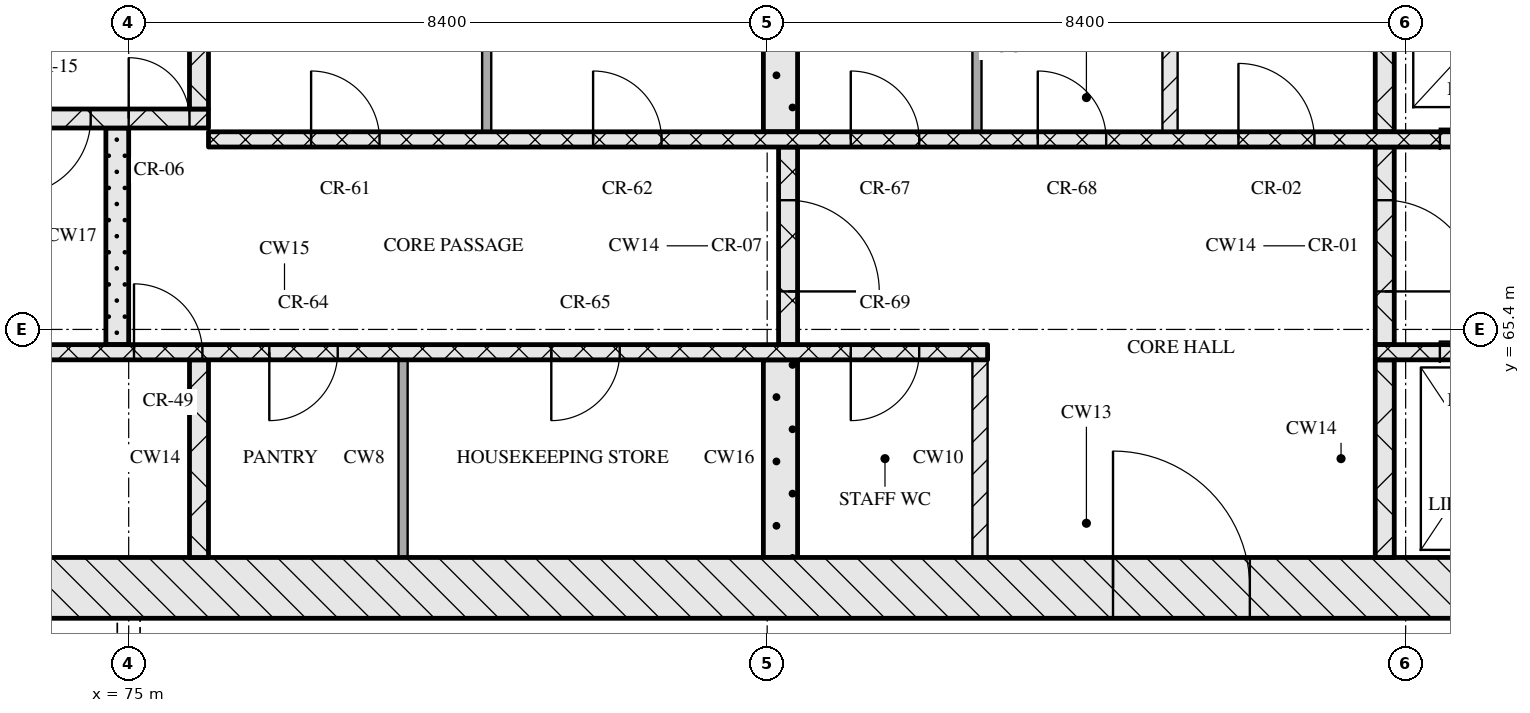
"""IFC4 building model, lengths in metres.
Left out: names, types, materials, properties, quantities, classifications, styles, units other than length and angle.
Written with IfcOpenShell. Run it as: python <this file> out.ifc"""

import sys

from ifc_helpers import new_model, si_unit, direction, frame, frame_2d, origin, place, context, subcontext, project, spatial, rectangle, extrude, element, fill, save


model = new_model("IFC4")
c1 = context("Model", 3, precision=1e-05, world=origin(), true_north=direction((0.0, 1.0)))
c2 = subcontext(c1, "Body", "Model", "MODEL_VIEW")
j1 = project(units=[si_unit("LENGTHUNIT", "METRE"), si_unit("PLANEANGLEUNIT", "RADIAN")], contexts=[c1])
p1 = place(None, origin())
s1 = spatial("IfcSite", under=j1, at=p1, CompositionType="ELEMENT")
p2 = place(p1, origin())
s2 = spatial("IfcBuilding", under=s1, at=p2, CompositionType="ELEMENT")
p3 = place(p2, frame((0.0, 0.0, 172.65)))
s3 = spatial("IfcBuildingStorey", under=s2, at=p3, CompositionType="ELEMENT", Elevation=172.65)
p4 = place(p3, frame((67.0, 62.0, 0.0), z_axis=(0.0, 0.0, 1.0), x_axis=(1.0, 0.0, 0.0)))
e1 = element("IfcWall", 1, at=p4, inside=s3, PredefinedType="SOLIDWALL", context=c2, shape_type="SweptSolid", body=[
    extrude(rectangle(XDim=41.2, YDim=0.8, at=frame_2d((20.6, 0.0))), origin(), (0.0, 0.0, 1.0), 3.32),
])
p5 = place(p4, frame((20.95, 0.0, 0.0)))
e2 = element("IfcOpeningElement", 2, at=p5, cuts=e1, PredefinedType="OPENING", context=c2, shape_type="SweptSolid", body=[
    extrude(rectangle(XDim=1.8, YDim=2.1, at=frame_2d((0.9, 1.05))), frame((0.0, 0.41, 0.0), z_axis=(0.0, -1.0, 0.0), x_axis=(1.0, 0.0, 0.0)), (0.0, 0.0, 1.0), 0.82),
])
p6 = place(p3, frame((75.925, 62.4, 0.0), z_axis=(0.0, 0.0, 1.0), x_axis=(0.0, 1.0, 0.0)))
e3 = element("IfcWall", 3, at=p6, inside=s3, PredefinedType="SOLIDWALL", context=c2, shape_type="SweptSolid", body=[
    extrude(rectangle(XDim=2.6, YDim=0.25, at=frame_2d((1.3, 0.0))), origin(), (0.0, 0.0, 1.0), 3.32),
])
p7 = place(p3, frame((78.61, 62.4, 0.0), z_axis=(0.0, 0.0, 1.0), x_axis=(0.0, 1.0, 0.0)))
e4 = element("IfcWall", 4, at=p7, inside=s3, PredefinedType="PARTITIONING", context=c2, shape_type="SweptSolid", body=[
    extrude(rectangle(XDim=2.6, YDim=0.12, at=frame_2d((1.3, 0.0))), origin(), (0.0, 0.0, 1.0), 3.32),
])
p8 = place(p3, frame((83.575, 62.4, 0.0), z_axis=(0.0, 0.0, 1.0), x_axis=(0.0, 1.0, 0.0)))
e5 = element("IfcWall", 5, at=p8, inside=s3, PredefinedType="SOLIDWALL", context=c2, shape_type="SweptSolid", body=[
    extrude(rectangle(XDim=2.6, YDim=0.45, at=frame_2d((1.3, 0.0))), origin(), (0.0, 0.0, 1.0), 3.32),
])
p9 = place(p3, frame((86.2, 62.4, 0.0), z_axis=(0.0, 0.0, 1.0), x_axis=(0.0, 1.0, 0.0)))
e6 = element("IfcWall", 6, at=p9, inside=s3, PredefinedType="PARTITIONING", context=c2, shape_type="SweptSolid", body=[
    extrude(rectangle(XDim=2.6, YDim=0.2, at=frame_2d((1.3, 0.0))), origin(), (0.0, 0.0, 1.0), 3.32),
])
p10 = place(p3, frame((91.525, 62.4, 0.0), z_axis=(0.0, 0.0, 1.0), x_axis=(0.0, 1.0, 0.0)))
e7 = element("IfcWall", 7, at=p10, inside=s3, PredefinedType="SOLIDWALL", context=c2, shape_type="SweptSolid", body=[
    extrude(rectangle(XDim=2.6, YDim=0.25, at=frame_2d((1.3, 0.0))), origin(), (0.0, 0.0, 1.0), 3.32),
])
p11 = place(p3, frame((67.8, 65.1, 0.0), z_axis=(0.0, 0.0, 1.0), x_axis=(1.0, 0.0, 0.0)))
e8 = element("IfcWall", 8, at=p11, inside=s3, PredefinedType="SOLIDWALL", context=c2, shape_type="SweptSolid", body=[
    extrude(rectangle(XDim=18.5, YDim=0.2, at=frame_2d((9.25, 0.0))), origin(), (0.0, 0.0, 1.0), 3.32),
])
p12 = place(p11, frame((7.27, 0.0, 0.0)))
e9 = element("IfcOpeningElement", 9, at=p12, cuts=e8, PredefinedType="OPENING", context=c2, shape_type="SweptSolid", body=[
    extrude(rectangle(XDim=0.9, YDim=2.1, at=frame_2d((0.45, 1.05))), frame((0.0, 0.11, 0.0), z_axis=(0.0, -1.0, 0.0), x_axis=(1.0, 0.0, 0.0)), (0.0, 0.0, 1.0), 0.22),
])
p13 = place(p11, frame((9.05, 0.0, 0.0)))
e10 = element("IfcOpeningElement", 10, at=p13, cuts=e8, PredefinedType="OPENING", context=c2, shape_type="SweptSolid", body=[
    extrude(rectangle(XDim=0.9, YDim=2.1, at=frame_2d((0.45, 1.05))), frame((0.0, 0.11, 0.0), z_axis=(0.0, -1.0, 0.0), x_axis=(1.0, 0.0, 0.0)), (0.0, 0.0, 1.0), 0.22),
])
p14 = place(p11, frame((12.76, 0.0, 0.0)))
e11 = element("IfcOpeningElement", 11, at=p14, cuts=e8, PredefinedType="OPENING", context=c2, shape_type="SweptSolid", body=[
    extrude(rectangle(XDim=0.9, YDim=2.1, at=frame_2d((0.45, 1.05))), frame((0.0, 0.11, 0.0), z_axis=(0.0, -1.0, 0.0), x_axis=(1.0, 0.0, 0.0)), (0.0, 0.0, 1.0), 0.22),
])
p15 = place(p11, frame((16.7, 0.0, 0.0)))
e12 = element("IfcOpeningElement", 12, at=p15, cuts=e8, PredefinedType="OPENING", context=c2, shape_type="SweptSolid", body=[
    extrude(rectangle(XDim=0.9, YDim=2.1, at=frame_2d((0.45, 1.05))), frame((0.0, 0.11, 0.0), z_axis=(0.0, -1.0, 0.0), x_axis=(1.0, 0.0, 0.0)), (0.0, 0.0, 1.0), 0.22),
])
p16 = place(p3, frame((91.4, 65.1, 0.0), z_axis=(0.0, 0.0, 1.0), x_axis=(1.0, 0.0, 0.0)))
e13 = element("IfcWall", 13, at=p16, inside=s3, PredefinedType="SOLIDWALL", context=c2, shape_type="SweptSolid", body=[
    extrude(rectangle(XDim=16.0, YDim=0.2, at=frame_2d((8.0, 0.0))), origin(), (0.0, 0.0, 1.0), 3.32),
])
p17 = place(p16, frame((0.85, 0.0, 0.0)))
e14 = element("IfcOpeningElement", 14, at=p17, cuts=e13, PredefinedType="OPENING", context=c2, shape_type="SweptSolid", body=[
    extrude(rectangle(XDim=1.1, YDim=2.1, at=frame_2d((0.55, 1.05))), frame((0.0, 0.11, 0.0), z_axis=(0.0, -1.0, 0.0), x_axis=(1.0, 0.0, 0.0)), (0.0, 0.0, 1.0), 0.22),
])
p18 = place(p16, frame((3.35, 0.0, 0.0)))
e15 = element("IfcOpeningElement", 15, at=p18, cuts=e13, PredefinedType="OPENING", context=c2, shape_type="SweptSolid", body=[
    extrude(rectangle(XDim=1.1, YDim=2.1, at=frame_2d((0.55, 1.05))), frame((0.0, 0.11, 0.0), z_axis=(0.0, -1.0, 0.0), x_axis=(1.0, 0.0, 0.0)), (0.0, 0.0, 1.0), 0.22),
])
p19 = place(p16, frame((5.85, 0.0, 0.0)))
e16 = element("IfcOpeningElement", 16, at=p19, cuts=e13, PredefinedType="OPENING", context=c2, shape_type="SweptSolid", body=[
    extrude(rectangle(XDim=1.1, YDim=2.1, at=frame_2d((0.55, 1.05))), frame((0.0, 0.11, 0.0), z_axis=(0.0, -1.0, 0.0), x_axis=(1.0, 0.0, 0.0)), (0.0, 0.0, 1.0), 0.22),
])
p20 = place(p16, frame((7.83, 0.0, 0.0)))
e17 = element("IfcOpeningElement", 17, at=p20, cuts=e13, PredefinedType="OPENING", context=c2, shape_type="SweptSolid", body=[
    extrude(rectangle(XDim=0.9, YDim=2.1, at=frame_2d((0.45, 1.05))), frame((0.0, 0.11, 0.0), z_axis=(0.0, -1.0, 0.0), x_axis=(1.0, 0.0, 0.0)), (0.0, 0.0, 1.0), 0.22),
])
p21 = place(p3, frame((74.85, 65.2, 0.0), z_axis=(0.0, 0.0, 1.0), x_axis=(0.0, 1.0, 0.0)))
e18 = element("IfcWall", 18, at=p21, inside=s3, PredefinedType="SOLIDWALL", context=c2, shape_type="SweptSolid", body=[
    extrude(rectangle(XDim=2.85, YDim=0.3, at=frame_2d((1.425, 0.0))), origin(), (0.0, 0.0, 1.0), 3.32),
])
p22 = place(p3, frame((83.675, 65.2, 0.0), z_axis=(0.0, 0.0, 1.0), x_axis=(0.0, 1.0, 0.0)))
e19 = element("IfcWall", 19, at=p22, inside=s3, PredefinedType="SOLIDWALL", context=c2, shape_type="SweptSolid", body=[
    extrude(rectangle(XDim=2.6, YDim=0.25, at=frame_2d((1.3, 0.0))), origin(), (0.0, 0.0, 1.0), 3.32),
])
p23 = place(p22, frame((0.7, 0.0, 0.0)))
e20 = element("IfcOpeningElement", 20, at=p23, cuts=e19, PredefinedType="OPENING", context=c2, shape_type="SweptSolid", body=[
    extrude(rectangle(XDim=1.2, YDim=2.1, at=frame_2d((0.6, 1.05))), frame((0.0, 0.135, 0.0), z_axis=(0.0, -1.0, 0.0), x_axis=(1.0, 0.0, 0.0)), (0.0, 0.0, 1.0), 0.27),
])
p24 = place(p3, frame((91.525, 65.2, 0.0), z_axis=(0.0, 0.0, 1.0), x_axis=(0.0, 1.0, 0.0)))
e21 = element("IfcWall", 21, at=p24, inside=s3, PredefinedType="SOLIDWALL", context=c2, shape_type="SweptSolid", body=[
    extrude(rectangle(XDim=2.6, YDim=0.25, at=frame_2d((1.3, 0.0))), origin(), (0.0, 0.0, 1.0), 3.32),
])
p25 = place(p24, frame((0.7, 0.0, 0.0)))
e22 = element("IfcOpeningElement", 22, at=p25, cuts=e21, PredefinedType="OPENING", context=c2, shape_type="SweptSolid", body=[
    extrude(rectangle(XDim=1.2, YDim=2.1, at=frame_2d((0.6, 1.05))), frame((0.0, 0.135, 0.0), z_axis=(0.0, -1.0, 0.0), x_axis=(1.0, 0.0, 0.0)), (0.0, 0.0, 1.0), 0.27),
])
p26 = place(p3, frame((76.05, 67.9, 0.0), z_axis=(0.0, 0.0, 1.0), x_axis=(1.0, 0.0, 0.0)))
e23 = element("IfcWall", 23, at=p26, inside=s3, PredefinedType="SOLIDWALL", context=c2, shape_type="SweptSolid", body=[
    extrude(rectangle(XDim=23.1, YDim=0.2, at=frame_2d((11.55, 0.0))), origin(), (0.0, 0.0, 1.0), 3.32),
])
p27 = place(p26, frame((1.35, 0.0, 0.0)))
e24 = element("IfcOpeningElement", 24, at=p27, cuts=e23, PredefinedType="OPENING", context=c2, shape_type="SweptSolid", body=[
    extrude(rectangle(XDim=0.9, YDim=2.1, at=frame_2d((0.45, 1.05))), frame((0.0, 0.11, 0.0), z_axis=(0.0, -1.0, 0.0), x_axis=(1.0, 0.0, 0.0)), (0.0, 0.0, 1.0), 0.22),
])
p28 = place(p26, frame((5.06, 0.0, 0.0)))
e25 = element("IfcOpeningElement", 25, at=p28, cuts=e23, PredefinedType="OPENING", context=c2, shape_type="SweptSolid", body=[
    extrude(rectangle(XDim=0.9, YDim=2.1, at=frame_2d((0.45, 1.05))), frame((0.0, 0.11, 0.0), z_axis=(0.0, -1.0, 0.0), x_axis=(1.0, 0.0, 0.0)), (0.0, 0.0, 1.0), 0.22),
])
p29 = place(p26, frame((8.45, 0.0, 0.0)))
e26 = element("IfcOpeningElement", 26, at=p29, cuts=e23, PredefinedType="OPENING", context=c2, shape_type="SweptSolid", body=[
    extrude(rectangle(XDim=0.9, YDim=2.1, at=frame_2d((0.45, 1.05))), frame((0.0, 0.11, 0.0), z_axis=(0.0, -1.0, 0.0), x_axis=(1.0, 0.0, 0.0)), (0.0, 0.0, 1.0), 0.22),
])
p30 = place(p26, frame((10.91, 0.0, 0.0)))
e27 = element("IfcOpeningElement", 27, at=p30, cuts=e23, PredefinedType="OPENING", context=c2, shape_type="SweptSolid", body=[
    extrude(rectangle(XDim=0.9, YDim=2.1, at=frame_2d((0.45, 1.05))), frame((0.0, 0.11, 0.0), z_axis=(0.0, -1.0, 0.0), x_axis=(1.0, 0.0, 0.0)), (0.0, 0.0, 1.0), 0.22),
])
p31 = place(p26, frame((13.55, 0.0, 0.0)))
e28 = element("IfcOpeningElement", 28, at=p31, cuts=e23, PredefinedType="OPENING", context=c2, shape_type="SweptSolid", body=[
    extrude(rectangle(XDim=1.0, YDim=2.1, at=frame_2d((0.5, 1.05))), frame((0.0, 0.11, 0.0), z_axis=(0.0, -1.0, 0.0), x_axis=(1.0, 0.0, 0.0)), (0.0, 0.0, 1.0), 0.22),
])
p32 = place(p26, frame((16.2, 0.0, 0.0)))
e29 = element("IfcOpeningElement", 29, at=p32, cuts=e23, PredefinedType="OPENING", context=c2, shape_type="SweptSolid", body=[
    extrude(rectangle(XDim=1.1, YDim=2.1, at=frame_2d((0.55, 1.05))), frame((0.0, 0.11, 0.0), z_axis=(0.0, -1.0, 0.0), x_axis=(1.0, 0.0, 0.0)), (0.0, 0.0, 1.0), 0.22),
])
p33 = place(p26, frame((18.7, 0.0, 0.0)))
e30 = element("IfcOpeningElement", 30, at=p33, cuts=e23, PredefinedType="OPENING", context=c2, shape_type="SweptSolid", body=[
    extrude(rectangle(XDim=1.1, YDim=2.1, at=frame_2d((0.55, 1.05))), frame((0.0, 0.11, 0.0), z_axis=(0.0, -1.0, 0.0), x_axis=(1.0, 0.0, 0.0)), (0.0, 0.0, 1.0), 0.22),
])
p34 = place(p26, frame((21.2, 0.0, 0.0)))
e31 = element("IfcOpeningElement", 31, at=p34, cuts=e23, PredefinedType="OPENING", context=c2, shape_type="SweptSolid", body=[
    extrude(rectangle(XDim=1.1, YDim=2.1, at=frame_2d((0.55, 1.05))), frame((0.0, 0.11, 0.0), z_axis=(0.0, -1.0, 0.0), x_axis=(1.0, 0.0, 0.0)), (0.0, 0.0, 1.0), 0.22),
])
p35 = place(p3, frame((79.71, 68.0, 0.0), z_axis=(0.0, 0.0, 1.0), x_axis=(0.0, 1.0, 0.0)))
e32 = element("IfcWall", 32, at=p35, inside=s3, PredefinedType="PARTITIONING", context=c2, shape_type="SweptSolid", body=[
    extrude(rectangle(XDim=2.6, YDim=0.12, at=frame_2d((1.3, 0.0))), origin(), (0.0, 0.0, 1.0), 3.32),
])
p36 = place(p3, frame((83.575, 68.0, 0.0), z_axis=(0.0, 0.0, 1.0), x_axis=(0.0, 1.0, 0.0)))
e33 = element("IfcWall", 33, at=p36, inside=s3, PredefinedType="SOLIDWALL", context=c2, shape_type="SweptSolid", body=[
    extrude(rectangle(XDim=2.6, YDim=0.45, at=frame_2d((1.3, 0.0))), origin(), (0.0, 0.0, 1.0), 3.32),
])
p37 = place(p3, frame((86.16, 68.0, 0.0), z_axis=(0.0, 0.0, 1.0), x_axis=(0.0, 1.0, 0.0)))
e34 = element("IfcWall", 34, at=p37, inside=s3, PredefinedType="PARTITIONING", context=c2, shape_type="SweptSolid", body=[
    extrude(rectangle(XDim=2.6, YDim=0.12, at=frame_2d((1.3, 0.0))), origin(), (0.0, 0.0, 1.0), 3.32),
])
p38 = place(p3, frame((88.7, 68.0, 0.0), z_axis=(0.0, 0.0, 1.0), x_axis=(0.0, 1.0, 0.0)))
e35 = element("IfcWall", 35, at=p38, inside=s3, PredefinedType="PARTITIONING", context=c2, shape_type="SweptSolid", body=[
    extrude(rectangle(XDim=2.6, YDim=0.2, at=frame_2d((1.3, 0.0))), origin(), (0.0, 0.0, 1.0), 3.32),
])
p39 = place(p3, frame((91.525, 68.0, 0.0), z_axis=(0.0, 0.0, 1.0), x_axis=(0.0, 1.0, 0.0)))
e36 = element("IfcWall", 36, at=p39, inside=s3, PredefinedType="SOLIDWALL", context=c2, shape_type="SweptSolid", body=[
    extrude(rectangle(XDim=2.6, YDim=0.25, at=frame_2d((1.3, 0.0))), origin(), (0.0, 0.0, 1.0), 3.32),
])
p40 = place(p3, frame((67.8, 68.175, 0.0), z_axis=(0.0, 0.0, 1.0), x_axis=(1.0, 0.0, 0.0)))
e37 = element("IfcWall", 37, at=p40, inside=s3, PredefinedType="SOLIDWALL", context=c2, shape_type="SweptSolid", body=[
    extrude(rectangle(XDim=8.25, YDim=0.25, at=frame_2d((4.125, 0.0))), origin(), (0.0, 0.0, 1.0), 3.32),
])
p41 = place(p40, frame((5.7, 0.0, 0.0)))
e38 = element("IfcOpeningElement", 38, at=p41, cuts=e37, PredefinedType="OPENING", context=c2, shape_type="SweptSolid", body=[
    extrude(rectangle(XDim=1.0, YDim=2.1, at=frame_2d((0.5, 1.05))), frame((0.0, 0.135, 0.0), z_axis=(0.0, -1.0, 0.0), x_axis=(1.0, 0.0, 0.0)), (0.0, 0.0, 1.0), 0.27),
])
p42 = place(p40, frame((7.2, 0.0, 0.0)))
e39 = element("IfcOpeningElement", 39, at=p42, cuts=e37, PredefinedType="OPENING", context=c2, shape_type="SweptSolid", body=[
    extrude(rectangle(XDim=0.8, YDim=2.1, at=frame_2d((0.4, 1.05))), frame((0.0, 0.135, 0.0), z_axis=(0.0, -1.0, 0.0), x_axis=(1.0, 0.0, 0.0)), (0.0, 0.0, 1.0), 0.27),
])
p43 = place(p3, frame((75.925, 68.3, 0.0), z_axis=(0.0, 0.0, 1.0), x_axis=(0.0, 1.0, 0.0)))
e40 = element("IfcWall", 40, at=p43, inside=s3, PredefinedType="SOLIDWALL", context=c2, shape_type="SweptSolid", body=[
    extrude(rectangle(XDim=2.3, YDim=0.25, at=frame_2d((1.15, 0.0))), origin(), (0.0, 0.0, 1.0), 3.32),
])
p44 = place(p5, origin())
e41 = element("IfcDoor", 41, at=p44, inside=s3, OperationType="DOUBLE_DOOR_SINGLE_SWING", PredefinedType="DOOR", context=c2, shape_type="SweptSolid", body=[
    extrude(rectangle(XDim=1.8, YDim=2.1, at=frame_2d((0.9, 1.05))), frame((0.0, 0.025, 0.0), z_axis=(0.0, -1.0, 0.0), x_axis=(1.0, 0.0, 0.0)), (0.0, 0.0, 1.0), 0.05),
])
fill(e2, e41)
p45 = place(p12, origin())
e42 = element("IfcDoor", 42, at=p45, inside=s3, OperationType="SINGLE_SWING_LEFT", PredefinedType="DOOR", context=c2, shape_type="SweptSolid", body=[
    extrude(rectangle(XDim=0.9, YDim=2.1, at=frame_2d((0.45, 1.05))), frame((0.0, 0.025, 0.0), z_axis=(0.0, -1.0, 0.0), x_axis=(1.0, 0.0, 0.0)), (0.0, 0.0, 1.0), 0.05),
])
fill(e9, e42)
p46 = place(p13, origin())
e43 = element("IfcDoor", 43, at=p46, inside=s3, OperationType="SINGLE_SWING_RIGHT", PredefinedType="DOOR", context=c2, shape_type="SweptSolid", body=[
    extrude(rectangle(XDim=0.9, YDim=2.1, at=frame_2d((0.45, 1.05))), frame((0.0, 0.025, 0.0), z_axis=(0.0, -1.0, 0.0), x_axis=(1.0, 0.0, 0.0)), (0.0, 0.0, 1.0), 0.05),
])
fill(e10, e43)
p47 = place(p14, origin())
e44 = element("IfcDoor", 44, at=p47, inside=s3, OperationType="SINGLE_SWING_RIGHT", PredefinedType="DOOR", context=c2, shape_type="SweptSolid", body=[
    extrude(rectangle(XDim=0.9, YDim=2.1, at=frame_2d((0.45, 1.05))), frame((0.0, 0.025, 0.0), z_axis=(0.0, -1.0, 0.0), x_axis=(1.0, 0.0, 0.0)), (0.0, 0.0, 1.0), 0.05),
])
fill(e11, e44)
p48 = place(p15, origin())
e45 = element("IfcDoor", 45, at=p48, inside=s3, OperationType="SINGLE_SWING_RIGHT", PredefinedType="DOOR", context=c2, shape_type="SweptSolid", body=[
    extrude(rectangle(XDim=0.9, YDim=2.1, at=frame_2d((0.45, 1.05))), frame((0.0, 0.025, 0.0), z_axis=(0.0, -1.0, 0.0), x_axis=(1.0, 0.0, 0.0)), (0.0, 0.0, 1.0), 0.05),
])
fill(e12, e45)
p49 = place(p17, origin())
e46 = element("IfcDoor", 46, at=p49, inside=s3, OperationType="SLIDING_TO_LEFT", PredefinedType="DOOR", context=c2, shape_type="SweptSolid", body=[
    extrude(rectangle(XDim=1.1, YDim=2.1, at=frame_2d((0.55, 1.05))), frame((0.0, 0.025, 0.0), z_axis=(0.0, -1.0, 0.0), x_axis=(1.0, 0.0, 0.0)), (0.0, 0.0, 1.0), 0.05),
])
fill(e14, e46)
p50 = place(p23, origin())
e47 = element("IfcDoor", 47, at=p50, inside=s3, OperationType="SINGLE_SWING_RIGHT", PredefinedType="DOOR", context=c2, shape_type="SweptSolid", body=[
    extrude(rectangle(XDim=1.2, YDim=2.1, at=frame_2d((0.6, 1.05))), frame((0.0, 0.025, 0.0), z_axis=(0.0, -1.0, 0.0), x_axis=(1.0, 0.0, 0.0)), (0.0, 0.0, 1.0), 0.05),
])
fill(e20, e47)
p51 = place(p25, origin())
e48 = element("IfcDoor", 48, at=p51, inside=s3, OperationType="SINGLE_SWING_RIGHT", PredefinedType="DOOR", context=c2, shape_type="SweptSolid", body=[
    extrude(rectangle(XDim=1.2, YDim=2.1, at=frame_2d((0.6, 1.05))), frame((0.0, 0.025, 0.0), z_axis=(0.0, -1.0, 0.0), x_axis=(1.0, 0.0, 0.0)), (0.0, 0.0, 1.0), 0.05),
])
fill(e22, e48)
p52 = place(p27, origin())
e49 = element("IfcDoor", 49, at=p52, inside=s3, OperationType="SINGLE_SWING_LEFT", PredefinedType="DOOR", context=c2, shape_type="SweptSolid", body=[
    extrude(rectangle(XDim=0.9, YDim=2.1, at=frame_2d((0.45, 1.05))), frame((0.0, 0.025, 0.0), z_axis=(0.0, -1.0, 0.0), x_axis=(1.0, 0.0, 0.0)), (0.0, 0.0, 1.0), 0.05),
])
fill(e24, e49)
p53 = place(p28, origin())
e50 = element("IfcDoor", 50, at=p53, inside=s3, OperationType="SINGLE_SWING_LEFT", PredefinedType="DOOR", context=c2, shape_type="SweptSolid", body=[
    extrude(rectangle(XDim=0.9, YDim=2.1, at=frame_2d((0.45, 1.05))), frame((0.0, 0.025, 0.0), z_axis=(0.0, -1.0, 0.0), x_axis=(1.0, 0.0, 0.0)), (0.0, 0.0, 1.0), 0.05),
])
fill(e25, e50)
p54 = place(p29, origin())
e51 = element("IfcDoor", 51, at=p54, inside=s3, OperationType="SINGLE_SWING_LEFT", PredefinedType="DOOR", context=c2, shape_type="SweptSolid", body=[
    extrude(rectangle(XDim=0.9, YDim=2.1, at=frame_2d((0.45, 1.05))), frame((0.0, 0.025, 0.0), z_axis=(0.0, -1.0, 0.0), x_axis=(1.0, 0.0, 0.0)), (0.0, 0.0, 1.0), 0.05),
])
fill(e26, e51)
p55 = place(p30, origin())
e52 = element("IfcDoor", 52, at=p55, inside=s3, OperationType="SINGLE_SWING_LEFT", PredefinedType="DOOR", context=c2, shape_type="SweptSolid", body=[
    extrude(rectangle(XDim=0.9, YDim=2.1, at=frame_2d((0.45, 1.05))), frame((0.0, 0.025, 0.0), z_axis=(0.0, -1.0, 0.0), x_axis=(1.0, 0.0, 0.0)), (0.0, 0.0, 1.0), 0.05),
])
fill(e27, e52)
p56 = place(p31, origin())
e53 = element("IfcDoor", 53, at=p56, inside=s3, OperationType="SINGLE_SWING_LEFT", PredefinedType="DOOR", context=c2, shape_type="SweptSolid", body=[
    extrude(rectangle(XDim=1.0, YDim=2.1, at=frame_2d((0.5, 1.05))), frame((0.0, 0.025, 0.0), z_axis=(0.0, -1.0, 0.0), x_axis=(1.0, 0.0, 0.0)), (0.0, 0.0, 1.0), 0.05),
])
fill(e28, e53)
p57 = place(p32, origin())
e54 = element("IfcDoor", 54, at=p57, inside=s3, OperationType="SLIDING_TO_RIGHT", PredefinedType="DOOR", context=c2, shape_type="SweptSolid", body=[
    extrude(rectangle(XDim=1.1, YDim=2.1, at=frame_2d((0.55, 1.05))), frame((0.0, 0.025, 0.0), z_axis=(0.0, -1.0, 0.0), x_axis=(1.0, 0.0, 0.0)), (0.0, 0.0, 1.0), 0.05),
])
fill(e29, e54)
p58 = place(p41, origin())
e55 = element("IfcDoor", 55, at=p58, inside=s3, OperationType="SINGLE_SWING_RIGHT", PredefinedType="DOOR", context=c2, shape_type="SweptSolid", body=[
    extrude(rectangle(XDim=1.0, YDim=2.1, at=frame_2d((0.5, 1.05))), frame((0.0, 0.025, 0.0), z_axis=(0.0, -1.0, 0.0), x_axis=(1.0, 0.0, 0.0)), (0.0, 0.0, 1.0), 0.05),
])
fill(e38, e55)
p59 = place(p42, origin())
e56 = element("IfcDoor", 56, at=p59, inside=s3, OperationType="SINGLE_SWING_LEFT", PredefinedType="DOOR", context=c2, shape_type="SweptSolid", body=[
    extrude(rectangle(XDim=0.8, YDim=2.1, at=frame_2d((0.4, 1.05))), frame((0.0, 0.025, 0.0), z_axis=(0.0, -1.0, 0.0), x_axis=(1.0, 0.0, 0.0)), (0.0, 0.0, 1.0), 0.05),
])
fill(e39, e56)
save(model, sys.argv[1])
